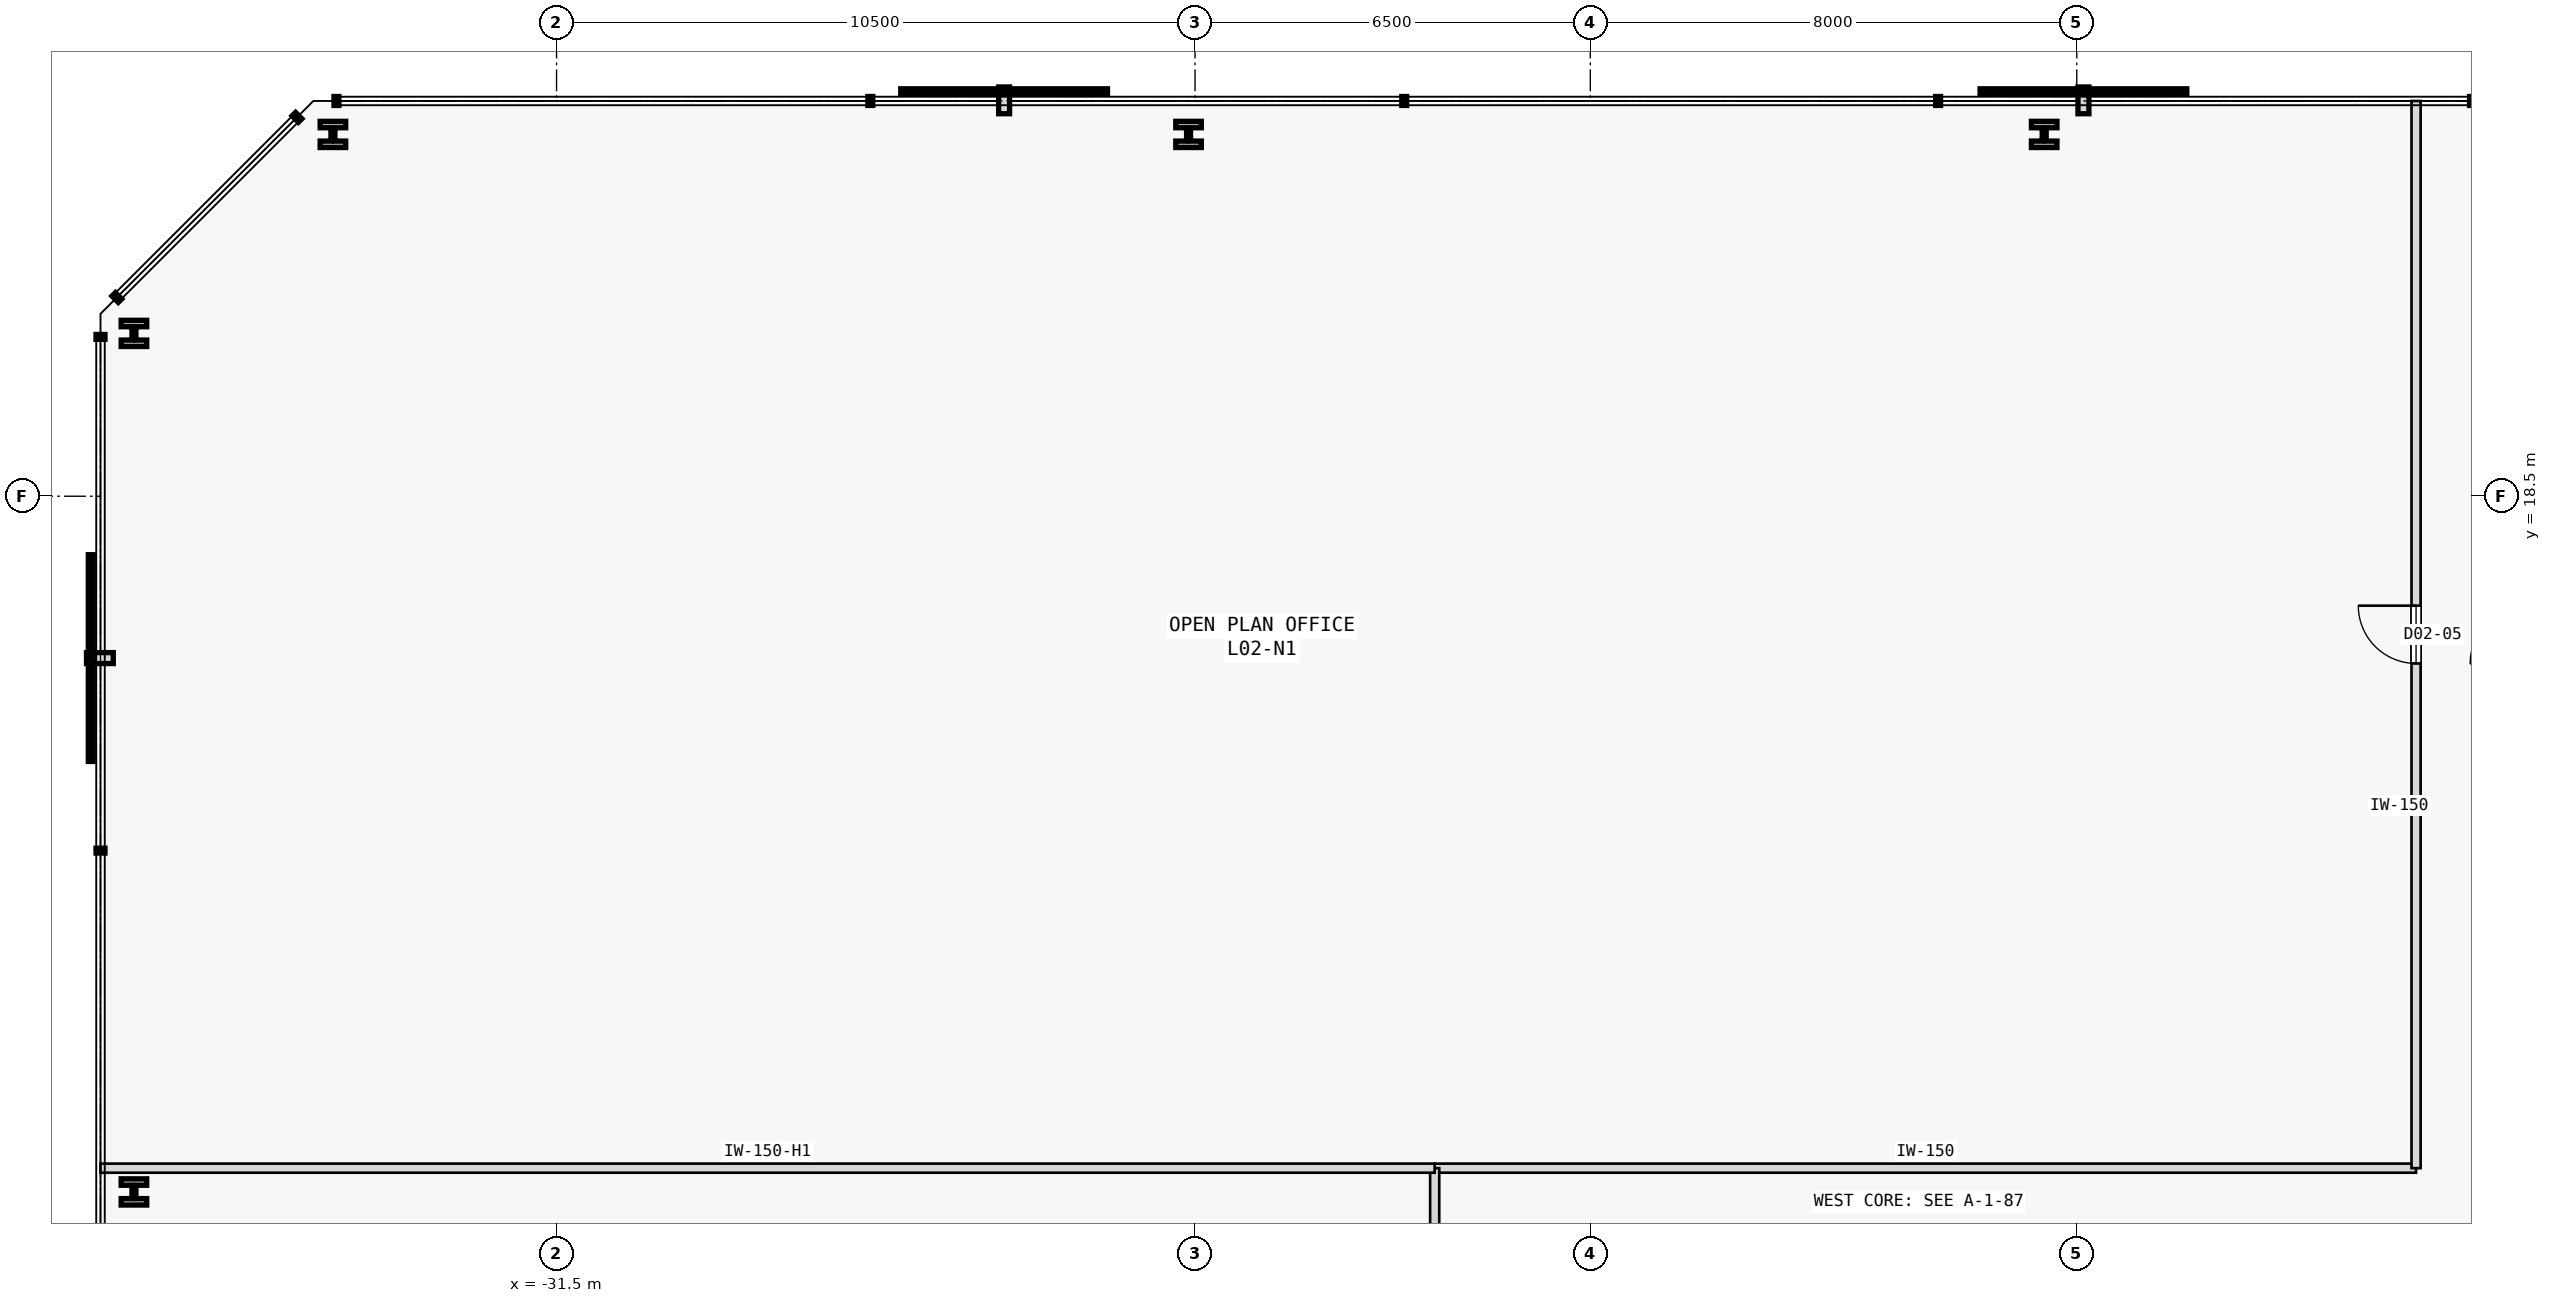
"""IFC4 building model, lengths in metres.
Left out: names, types, materials, properties, quantities, classifications, styles, units other than length and angle.
Written with IfcOpenShell. Run it as: python <this file> out.ifc"""

import sys

from ifc_helpers import new_model, si_unit, direction, frame, frame_2d, origin, origin_2d, place, context, subcontext, project, spatial, rectangle, i_section, extrude, element, fill, save


model = new_model("IFC4")
c1 = context("Model", 3, precision=1e-05, world=origin(), true_north=direction((0.0, 1.0)))
c2 = subcontext(c1, "Body", "Model", "MODEL_VIEW")
j1 = project(units=[si_unit("LENGTHUNIT", "METRE"), si_unit("PLANEANGLEUNIT", "RADIAN")], contexts=[c1])
p1 = place(None, origin())
s1 = spatial("IfcSite", under=j1, at=p1, CompositionType="ELEMENT")
p2 = place(p1, origin())
s2 = spatial("IfcBuilding", under=s1, at=p2, CompositionType="ELEMENT")
p3 = place(p2, frame((0.0, 0.0, 14.2)))
s3 = spatial("IfcBuildingStorey", under=s2, at=p3, CompositionType="ELEMENT", Elevation=14.2)
for number, where, z_axis, x_axis in (
    (1, (-7.036, 24.45, 0.0), (0.0, 0.0, 1.0), (1.0, 0.0, 0.0)),
    (2, (-21.107, 24.45, 0.0), (0.0, 0.0, 1.0), (1.0, 0.0, 0.0)),
    (3, (-35.178, 24.45, 0.0), (0.0, 0.0, 1.0), (1.0, 0.0, 0.0)),
    (4, (-38.45, 21.178, 0.0), (0.0, 0.0, 1.0), (1.0, 0.0, 0.0)),
    (5, (-38.45, 7.059, 0.0), (0.0, 0.0, 1.0), (1.0, 0.0, 0.0)),
):
    element("IfcColumn", number, at=place(p3, frame(where, z_axis=z_axis, x_axis=x_axis)), inside=s3, PredefinedType="COLUMN", context=c2, shape_type="SweptSolid", body=[
        extrude(i_section(OverallWidth=0.42, OverallDepth=0.431, WebThickness=0.065, FlangeThickness=0.106, FilletRadius=0.015, at=origin_2d()), origin(), (0.0, 0.0, 1.0), 3.8),
    ])
p4 = place(p3, frame((-17.059, 7.45, 0.0), z_axis=(0.0, 0.0, 1.0), x_axis=(1.0, 0.0, 0.0)))
e6 = element("IfcWall", 6, at=p4, inside=s3, PredefinedType="PARTITIONING", context=c2, shape_type="SweptSolid", body=[
    extrude(rectangle(XDim=16.139, YDim=0.15, at=frame_2d((8.07, 0.0))), origin(), (0.0, 0.0, 1.0), 3.575),
])
p5 = place(p3, frame((-0.92, 7.45, 0.0), z_axis=(0.0, 0.0, 1.0), x_axis=(0.0, 1.0, 0.0)))
e7 = element("IfcWall", 7, at=p5, inside=s3, PredefinedType="PARTITIONING", context=c2, shape_type="SweptSolid", body=[
    extrude(rectangle(XDim=17.55, YDim=0.15, at=frame_2d((8.775, 0.0))), origin(), (0.0, 0.0, 1.0), 3.575),
])
p6 = place(p5, frame((8.3, 0.0, 0.0)))
e8 = element("IfcOpeningElement", 8, at=p6, cuts=e7, PredefinedType="OPENING", context=c2, shape_type="SweptSolid", body=[
    extrude(rectangle(XDim=0.95, YDim=2.15, at=frame_2d((0.475, 1.075))), frame((0.0, 0.085, 0.0), z_axis=(0.0, -1.0, 0.0), x_axis=(1.0, 0.0, 0.0)), (0.0, 0.0, 1.0), 0.17),
])
p7 = place(p3, frame((-17.059, 0.92, 0.0), z_axis=(0.0, 0.0, 1.0), x_axis=(0.0, 1.0, 0.0)))
e9 = element("IfcWall", 9, at=p7, inside=s3, PredefinedType="PARTITIONING", context=c2, shape_type="SweptSolid", body=[
    extrude(rectangle(XDim=6.53, YDim=0.15, at=frame_2d((3.265, 0.0))), origin(), (0.0, 0.0, 1.0), 3.575),
])
p8 = place(p3, frame((-39.0, 7.45, 0.0), z_axis=(0.0, 0.0, 1.0), x_axis=(1.0, 0.0, 0.0)))
e10 = element("IfcWall", 10, at=p8, inside=s3, PredefinedType="PARTITIONING", context=c2, shape_type="SweptSolid", body=[
    extrude(rectangle(XDim=21.941, YDim=0.15, at=frame_2d((10.97, 0.0))), origin(), (0.0, 0.0, 1.0), 3.125),
])
p9 = place(p6, origin())
e11 = element("IfcDoor", 11, at=p9, inside=s3, OperationType="SINGLE_SWING_RIGHT", PredefinedType="DOOR", context=c2, shape_type="SweptSolid", body=[
    extrude(rectangle(XDim=0.95, YDim=2.15, at=frame_2d((0.475, 1.075))), frame((0.0, 0.025, 0.0), z_axis=(0.0, -1.0, 0.0), x_axis=(1.0, 0.0, 0.0)), (0.0, 0.0, 1.0), 0.05),
])
fill(e8, e11)
save(model, sys.argv[1])
